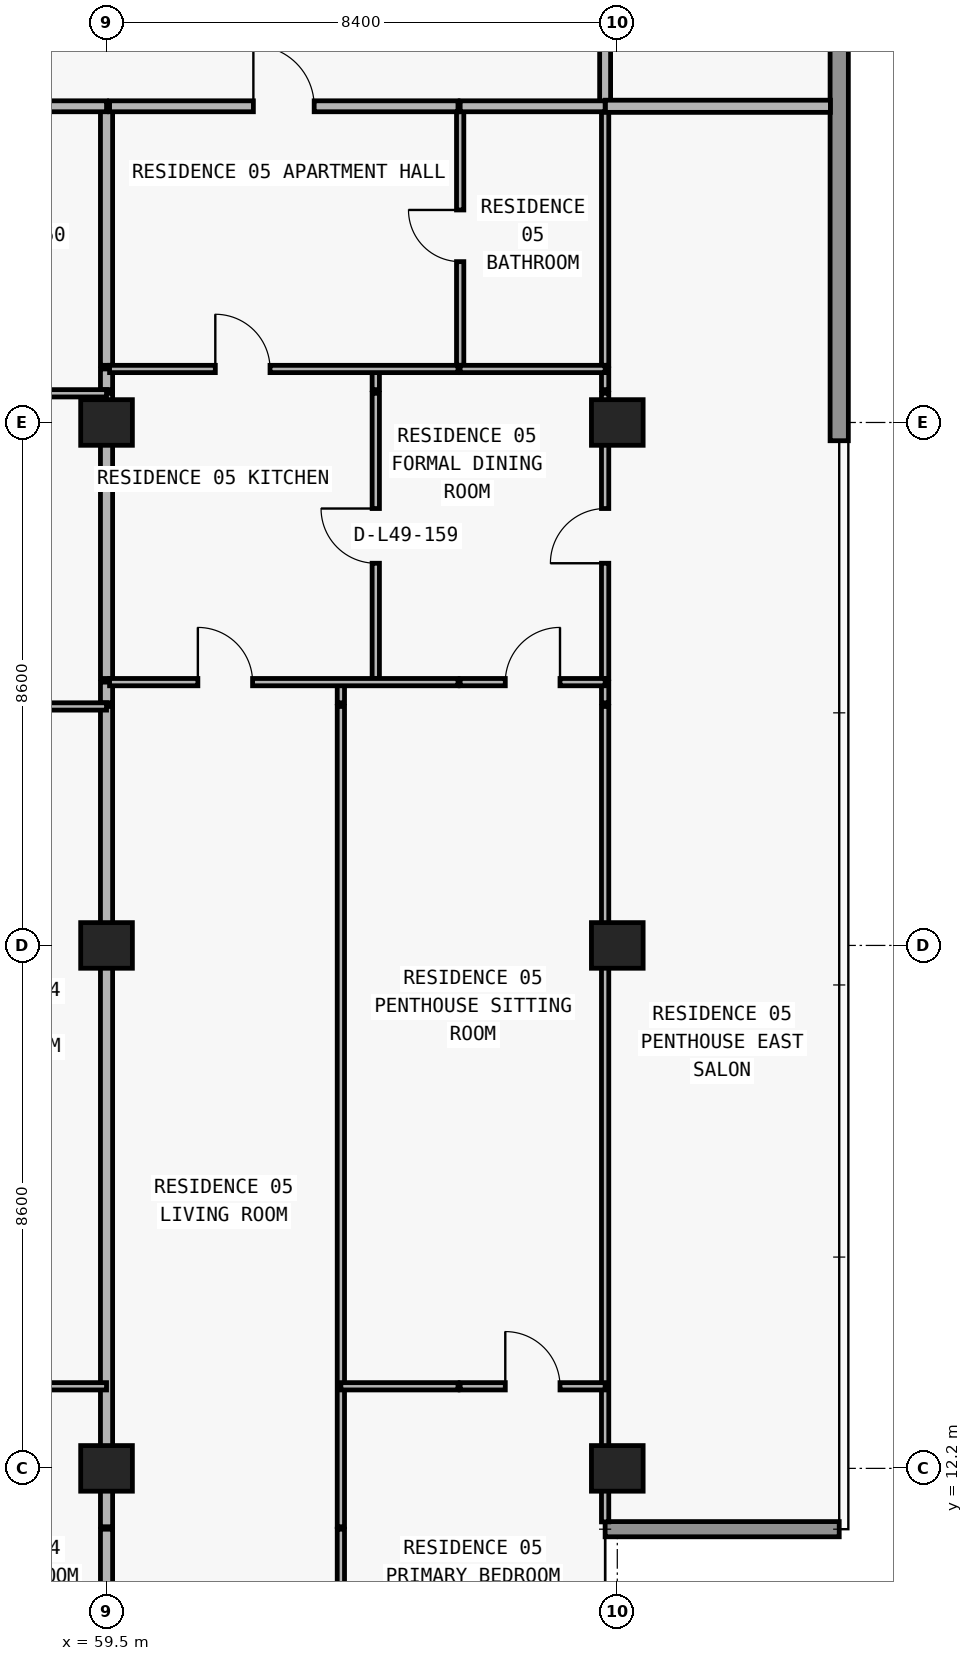
"""IFC4 building model, lengths in metres.
Left out: names, types, materials, properties, quantities, classifications, styles, units other than length and angle.
Written with IfcOpenShell. Run it as: python <this file> out.ifc"""

import sys

from ifc_helpers import new_model, si_unit, direction, frame, frame_2d, origin, origin_2d, place, context, subcontext, project, spatial, rectangle, extrude, element, fill, save


model = new_model("IFC4")
c1 = context("Model", 3, precision=1e-05, world=origin(), true_north=direction((0.0, 1.0)))
c2 = subcontext(c1, "Body", "Model", "MODEL_VIEW")
j1 = project(units=[si_unit("LENGTHUNIT", "METRE"), si_unit("PLANEANGLEUNIT", "RADIAN")], contexts=[c1])
p1 = place(None, origin())
s1 = spatial("IfcSite", under=j1, at=p1, CompositionType="ELEMENT")
p2 = place(p1, origin())
s2 = spatial("IfcBuilding", under=s1, at=p2, CompositionType="ELEMENT")
p3 = place(p2, frame((0.0, 0.0, 177.0)))
s3 = spatial("IfcBuildingStorey", under=s2, at=p3, CompositionType="ELEMENT", Elevation=177.0)
for number, where, z_axis, x_axis in (
    (1, (59.5, 12.2, 0.0), (0.0, 0.0, 1.0), (1.0, 0.0, 0.0)),
    (2, (67.9, 12.2, 0.0), (0.0, 0.0, 1.0), (1.0, 0.0, 0.0)),
    (3, (59.5, 20.8, 0.0), (0.0, 0.0, 1.0), (1.0, 0.0, 0.0)),
    (4, (67.9, 20.8, 0.0), (0.0, 0.0, 1.0), (1.0, 0.0, 0.0)),
    (5, (59.5, 29.4, 0.0), (0.0, 0.0, 1.0), (1.0, 0.0, 0.0)),
    (6, (67.9, 29.4, 0.0), (0.0, 0.0, 1.0), (1.0, 0.0, 0.0)),
):
    element("IfcColumn", number, at=place(p3, frame(where, z_axis=z_axis, x_axis=x_axis)), inside=s3, PredefinedType="COLUMN", context=c2, shape_type="SweptSolid", body=[
        extrude(rectangle(XDim=0.85, YDim=0.75, at=origin_2d()), origin(), (0.0, 0.0, 1.0), 3.05),
    ])
p4 = place(p3, frame((67.7, 11.2, 0.0), z_axis=(0.0, 0.0, 1.0), x_axis=(1.0, 0.0, 0.0)))
e7 = element("IfcWall", 7, at=p4, inside=s3, PredefinedType="ELEMENTEDWALL", context=c2, shape_type="SweptSolid", body=[
    extrude(rectangle(XDim=3.85, YDim=0.25, at=frame_2d((1.925, 0.0))), origin(), (0.0, 0.0, 1.0), 3.05),
])
p5 = place(p3, frame((71.55, 47.0, 0.0), z_axis=(0.0, 0.0, 1.0), x_axis=(0.0, -1.0, 0.0)))
e8 = element("IfcWall", 8, at=p5, inside=s3, PredefinedType="STANDARD", context=c2, shape_type="SweptSolid", body=[
    extrude(rectangle(XDim=17.9, YDim=0.3, at=frame_2d((8.95, 0.0))), origin(), (0.0, 0.0, 1.0), 3.05),
])
p6 = place(p3, frame((59.5, 7.895, 0.0), z_axis=(0.0, 0.0, 1.0), x_axis=(0.0, 1.0, 0.0)))
e9 = element("IfcWall", 9, at=p6, inside=s3, PredefinedType="PARTITIONING", context=c2, shape_type="SweptSolid", body=[
    extrude(rectangle(XDim=3.305, YDim=0.2, at=frame_2d((1.652, 0.0))), origin(), (0.0, 0.0, 1.0), 3.05),
])
p7 = place(p3, frame((59.5, 11.24, 0.0), z_axis=(0.0, 0.0, 1.0), x_axis=(0.0, 1.0, 0.0)))
e10 = element("IfcWall", 10, at=p7, inside=s3, PredefinedType="PARTITIONING", context=c2, shape_type="SweptSolid", body=[
    extrude(rectangle(XDim=13.49, YDim=0.2, at=frame_2d((6.745, 0.0))), origin(), (0.0, 0.0, 1.0), 2.263),
])
p8 = place(p3, frame((59.5, 24.79, 0.0), z_axis=(0.0, 0.0, 1.0), x_axis=(0.0, 1.0, 0.0)))
e11 = element("IfcWall", 11, at=p8, inside=s3, PredefinedType="PARTITIONING", context=c2, shape_type="SweptSolid", body=[
    extrude(rectangle(XDim=0.34, YDim=0.2, at=frame_2d((0.17, 0.0))), origin(), (0.0, 0.0, 1.0), 2.263),
])
p9 = place(p3, frame((59.5, 25.19, 0.0), z_axis=(0.0, 0.0, 1.0), x_axis=(0.0, 1.0, 0.0)))
e12 = element("IfcWall", 12, at=p9, inside=s3, PredefinedType="PARTITIONING", context=c2, shape_type="SweptSolid", body=[
    extrude(rectangle(XDim=4.69, YDim=0.2, at=frame_2d((2.345, 0.0))), origin(), (0.0, 0.0, 1.0), 2.263),
])
p10 = place(p3, frame((59.5, 29.94, 0.0), z_axis=(0.0, 0.0, 1.0), x_axis=(0.0, 1.0, 0.0)))
e13 = element("IfcWall", 13, at=p10, inside=s3, PredefinedType="PARTITIONING", context=c2, shape_type="SweptSolid", body=[
    extrude(rectangle(XDim=0.34, YDim=0.2, at=frame_2d((0.17, 0.0))), origin(), (0.0, 0.0, 1.0), 2.263),
])
p11 = place(p3, frame((59.5, 30.34, 0.0), z_axis=(0.0, 0.0, 1.0), x_axis=(0.0, 1.0, 0.0)))
e14 = element("IfcWall", 14, at=p11, inside=s3, PredefinedType="PARTITIONING", context=c2, shape_type="SweptSolid", body=[
    extrude(rectangle(XDim=4.26, YDim=0.2, at=frame_2d((2.13, 0.0))), origin(), (0.0, 0.0, 1.0), 2.263),
])
p12 = place(p3, frame((63.354, 7.895, 0.0), z_axis=(0.0, 0.0, 1.0), x_axis=(0.0, 1.0, 0.0)))
e15 = element("IfcWall", 15, at=p12, inside=s3, PredefinedType="PARTITIONING", context=c2, shape_type="SweptSolid", body=[
    extrude(rectangle(XDim=3.305, YDim=0.12, at=frame_2d((1.652, 0.0))), origin(), (0.0, 0.0, 1.0), 3.05),
])
p13 = place(p3, frame((63.354, 11.24, 0.0), z_axis=(0.0, 0.0, 1.0), x_axis=(0.0, 1.0, 0.0)))
e16 = element("IfcWall", 16, at=p13, inside=s3, PredefinedType="PARTITIONING", context=c2, shape_type="SweptSolid", body=[
    extrude(rectangle(XDim=13.49, YDim=0.12, at=frame_2d((6.745, 0.0))), origin(), (0.0, 0.0, 1.0), 3.05),
])
p14 = place(p3, frame((63.354, 24.79, 0.0), z_axis=(0.0, 0.0, 1.0), x_axis=(0.0, 1.0, 0.0)))
e17 = element("IfcWall", 17, at=p14, inside=s3, PredefinedType="PARTITIONING", context=c2, shape_type="SweptSolid", body=[
    extrude(rectangle(XDim=0.34, YDim=0.12, at=frame_2d((0.17, 0.0))), origin(), (0.0, 0.0, 1.0), 3.05),
])
p15 = place(p3, frame((63.928, 25.19, 0.0), z_axis=(0.0, 0.0, 1.0), x_axis=(0.0, 1.0, 0.0)))
e18 = element("IfcWall", 18, at=p15, inside=s3, PredefinedType="PARTITIONING", context=c2, shape_type="SweptSolid", body=[
    extrude(rectangle(XDim=4.69, YDim=0.12, at=frame_2d((2.345, 0.0))), origin(), (0.0, 0.0, 1.0), 2.499),
])
p16 = place(p15, frame((1.895, 0.0, 0.0)))
e19 = element("IfcOpeningElement", 19, at=p16, cuts=e18, PredefinedType="OPENING", context=c2, shape_type="SweptSolid", body=[
    extrude(rectangle(XDim=0.9, YDim=2.15, at=frame_2d((0.45, 1.075))), frame((0.0, 0.07, 0.0), z_axis=(0.0, -1.0, 0.0), x_axis=(1.0, 0.0, 0.0)), (0.0, 0.0, 1.0), 0.14),
])
p17 = place(p3, frame((63.928, 29.94, 0.0), z_axis=(0.0, 0.0, 1.0), x_axis=(0.0, 1.0, 0.0)))
e20 = element("IfcWall", 20, at=p17, inside=s3, PredefinedType="PARTITIONING", context=c2, shape_type="SweptSolid", body=[
    extrude(rectangle(XDim=0.34, YDim=0.12, at=frame_2d((0.17, 0.0))), origin(), (0.0, 0.0, 1.0), 2.499),
])
p18 = place(p3, frame((65.316, 30.34, 0.0), z_axis=(0.0, 0.0, 1.0), x_axis=(0.0, 1.0, 0.0)))
e21 = element("IfcWall", 21, at=p18, inside=s3, PredefinedType="PARTITIONING", context=c2, shape_type="SweptSolid", body=[
    extrude(rectangle(XDim=4.26, YDim=0.12, at=frame_2d((2.13, 0.0))), origin(), (0.0, 0.0, 1.0), 3.05),
])
p19 = place(p18, frame((1.705, 0.0, 0.0)))
e22 = element("IfcOpeningElement", 22, at=p19, cuts=e21, PredefinedType="OPENING", context=c2, shape_type="SweptSolid", body=[
    extrude(rectangle(XDim=0.85, YDim=2.1, at=frame_2d((0.425, 1.05))), frame((0.0, 0.07, 0.0), z_axis=(0.0, -1.0, 0.0), x_axis=(1.0, 0.0, 0.0)), (0.0, 0.0, 1.0), 0.14),
])
p20 = place(p3, frame((67.7, 11.32, 0.0), z_axis=(0.0, 0.0, 1.0), x_axis=(0.0, 1.0, 0.0)))
e23 = element("IfcWall", 23, at=p20, inside=s3, PredefinedType="PARTITIONING", context=c2, shape_type="SweptSolid", body=[
    extrude(rectangle(XDim=13.41, YDim=0.12, at=frame_2d((6.705, 0.0))), origin(), (0.0, 0.0, 1.0), 2.263),
])
p21 = place(p3, frame((67.7, 24.79, 0.0), z_axis=(0.0, 0.0, 1.0), x_axis=(0.0, 1.0, 0.0)))
e24 = element("IfcWall", 24, at=p21, inside=s3, PredefinedType="PARTITIONING", context=c2, shape_type="SweptSolid", body=[
    extrude(rectangle(XDim=0.34, YDim=0.12, at=frame_2d((0.17, 0.0))), origin(), (0.0, 0.0, 1.0), 2.263),
])
p22 = place(p3, frame((67.7, 25.19, 0.0), z_axis=(0.0, 0.0, 1.0), x_axis=(0.0, 1.0, 0.0)))
e25 = element("IfcWall", 25, at=p22, inside=s3, PredefinedType="PARTITIONING", context=c2, shape_type="SweptSolid", body=[
    extrude(rectangle(XDim=4.69, YDim=0.12, at=frame_2d((2.345, 0.0))), origin(), (0.0, 0.0, 1.0), 2.263),
])
p23 = place(p22, frame((1.895, 0.0, 0.0)))
e26 = element("IfcOpeningElement", 26, at=p23, cuts=e25, PredefinedType="OPENING", context=c2, shape_type="SweptSolid", body=[
    extrude(rectangle(XDim=0.9, YDim=2.15, at=frame_2d((0.45, 1.075))), frame((0.0, 0.07, 0.0), z_axis=(0.0, -1.0, 0.0), x_axis=(1.0, 0.0, 0.0)), (0.0, 0.0, 1.0), 0.14),
])
p24 = place(p3, frame((67.7, 29.94, 0.0), z_axis=(0.0, 0.0, 1.0), x_axis=(0.0, 1.0, 0.0)))
e27 = element("IfcWall", 27, at=p24, inside=s3, PredefinedType="PARTITIONING", context=c2, shape_type="SweptSolid", body=[
    extrude(rectangle(XDim=0.34, YDim=0.12, at=frame_2d((0.17, 0.0))), origin(), (0.0, 0.0, 1.0), 2.263),
])
p25 = place(p3, frame((67.7, 30.34, 0.0), z_axis=(0.0, 0.0, 1.0), x_axis=(0.0, 1.0, 0.0)))
e28 = element("IfcWall", 28, at=p25, inside=s3, PredefinedType="PARTITIONING", context=c2, shape_type="SweptSolid", body=[
    extrude(rectangle(XDim=4.26, YDim=0.12, at=frame_2d((2.13, 0.0))), origin(), (0.0, 0.0, 1.0), 2.263),
])
p26 = place(p3, frame((67.7, 34.605, 0.0), z_axis=(0.0, 0.0, 1.0), x_axis=(0.0, 1.0, 0.0)))
e29 = element("IfcWall", 29, at=p26, inside=s3, PredefinedType="PARTITIONING", context=c2, shape_type="SweptSolid", body=[
    extrude(rectangle(XDim=2.345, YDim=0.18, at=frame_2d((1.172, 0.0))), origin(), (0.0, 0.0, 1.0), 2.263),
])
p27 = place(p3, frame((55.72, 13.55, 0.0), z_axis=(0.0, 0.0, 1.0), x_axis=(1.0, 0.0, 0.0)))
e30 = element("IfcWall", 30, at=p27, inside=s3, PredefinedType="PARTITIONING", context=c2, shape_type="SweptSolid", body=[
    extrude(rectangle(XDim=3.78, YDim=0.12, at=frame_2d((1.89, 0.0))), origin(), (0.0, 0.0, 1.0), 3.05),
])
p28 = place(p27, frame((1.44, 0.0, 0.0)))
e31 = element("IfcOpeningElement", 31, at=p28, cuts=e30, PredefinedType="OPENING", context=c2, shape_type="SweptSolid", body=[
    extrude(rectangle(XDim=0.9, YDim=2.15, at=frame_2d((0.45, 1.075))), frame((0.0, 0.07, 0.0), z_axis=(0.0, -1.0, 0.0), x_axis=(1.0, 0.0, 0.0)), (0.0, 0.0, 1.0), 0.14),
])
p29 = place(p3, frame((63.354, 13.55, 0.0), z_axis=(0.0, 0.0, 1.0), x_axis=(1.0, 0.0, 0.0)))
e32 = element("IfcWall", 32, at=p29, inside=s3, PredefinedType="PARTITIONING", context=c2, shape_type="SweptSolid", body=[
    extrude(rectangle(XDim=1.926, YDim=0.12, at=frame_2d((0.963, 0.0))), origin(), (0.0, 0.0, 1.0), 3.05),
])
p30 = place(p3, frame((65.316, 13.55, 0.0), z_axis=(0.0, 0.0, 1.0), x_axis=(1.0, 0.0, 0.0)))
e33 = element("IfcWall", 33, at=p30, inside=s3, PredefinedType="PARTITIONING", context=c2, shape_type="SweptSolid", body=[
    extrude(rectangle(XDim=2.384, YDim=0.12, at=frame_2d((1.192, 0.0))), origin(), (0.0, 0.0, 1.0), 3.05),
])
p31 = place(p30, frame((0.742, 0.0, 0.0)))
e34 = element("IfcOpeningElement", 34, at=p31, cuts=e33, PredefinedType="OPENING", context=c2, shape_type="SweptSolid", body=[
    extrude(rectangle(XDim=0.9, YDim=2.15, at=frame_2d((0.45, 1.075))), frame((0.0, 0.07, 0.0), z_axis=(0.0, -1.0, 0.0), x_axis=(1.0, 0.0, 0.0)), (0.0, 0.0, 1.0), 0.14),
])
p32 = place(p3, frame((51.32, 24.73, 0.0), z_axis=(0.0, 0.0, 1.0), x_axis=(1.0, 0.0, 0.0)))
e35 = element("IfcWall", 35, at=p32, inside=s3, PredefinedType="PARTITIONING", context=c2, shape_type="SweptSolid", body=[
    extrude(rectangle(XDim=8.18, YDim=0.12, at=frame_2d((4.09, 0.0))), origin(), (0.0, 0.0, 1.0), 3.05),
])
p33 = place(p32, frame((1.583, 0.0, 0.0)))
e36 = element("IfcOpeningElement", 36, at=p33, cuts=e35, PredefinedType="OPENING", context=c2, shape_type="SweptSolid", body=[
    extrude(rectangle(XDim=0.9, YDim=2.15, at=frame_2d((0.45, 1.075))), frame((0.0, 0.07, 0.0), z_axis=(0.0, -1.0, 0.0), x_axis=(1.0, 0.0, 0.0)), (0.0, 0.0, 1.0), 0.14),
])
p34 = place(p32, frame((5.84, 0.0, 0.0)))
e37 = element("IfcOpeningElement", 37, at=p34, cuts=e35, PredefinedType="OPENING", context=c2, shape_type="SweptSolid", body=[
    extrude(rectangle(XDim=0.9, YDim=2.15, at=frame_2d((0.45, 1.075))), frame((0.0, 0.07, 0.0), z_axis=(0.0, -1.0, 0.0), x_axis=(1.0, 0.0, 0.0)), (0.0, 0.0, 1.0), 0.14),
])
p35 = place(p3, frame((59.55, 25.13, 0.0), z_axis=(0.0, 0.0, 1.0), x_axis=(1.0, 0.0, 0.0)))
e38 = element("IfcWall", 38, at=p35, inside=s3, PredefinedType="PARTITIONING", context=c2, shape_type="SweptSolid", body=[
    extrude(rectangle(XDim=5.73, YDim=0.12, at=frame_2d((2.865, 0.0))), origin(), (0.0, 0.0, 1.0), 3.05),
])
p36 = place(p35, frame((1.452, 0.0, 0.0)))
e39 = element("IfcOpeningElement", 39, at=p36, cuts=e38, PredefinedType="OPENING", context=c2, shape_type="SweptSolid", body=[
    extrude(rectangle(XDim=0.9, YDim=2.15, at=frame_2d((0.45, 1.075))), frame((0.0, 0.07, 0.0), z_axis=(0.0, -1.0, 0.0), x_axis=(1.0, 0.0, 0.0)), (0.0, 0.0, 1.0), 0.14),
])
p37 = place(p3, frame((65.316, 25.13, 0.0), z_axis=(0.0, 0.0, 1.0), x_axis=(1.0, 0.0, 0.0)))
e40 = element("IfcWall", 40, at=p37, inside=s3, PredefinedType="PARTITIONING", context=c2, shape_type="SweptSolid", body=[
    extrude(rectangle(XDim=2.384, YDim=0.12, at=frame_2d((1.192, 0.0))), origin(), (0.0, 0.0, 1.0), 3.05),
])
p38 = place(p37, frame((0.742, 0.0, 0.0)))
e41 = element("IfcOpeningElement", 41, at=p38, cuts=e40, PredefinedType="OPENING", context=c2, shape_type="SweptSolid", body=[
    extrude(rectangle(XDim=0.9, YDim=2.15, at=frame_2d((0.45, 1.075))), frame((0.0, 0.07, 0.0), z_axis=(0.0, -1.0, 0.0), x_axis=(1.0, 0.0, 0.0)), (0.0, 0.0, 1.0), 0.14),
])
p39 = place(p3, frame((51.1, 29.88, 0.0), z_axis=(0.0, 0.0, 1.0), x_axis=(1.0, 0.0, 0.0)))
e42 = element("IfcWall", 42, at=p39, inside=s3, PredefinedType="PARTITIONING", context=c2, shape_type="SweptSolid", body=[
    extrude(rectangle(XDim=8.4, YDim=0.12, at=frame_2d((4.2, 0.0))), origin(), (0.0, 0.0, 1.0), 3.05),
])
p40 = place(p39, frame((1.693, 0.0, 0.0)))
e43 = element("IfcOpeningElement", 43, at=p40, cuts=e42, PredefinedType="OPENING", context=c2, shape_type="SweptSolid", body=[
    extrude(rectangle(XDim=0.9, YDim=2.15, at=frame_2d((0.45, 1.075))), frame((0.0, 0.07, 0.0), z_axis=(0.0, -1.0, 0.0), x_axis=(1.0, 0.0, 0.0)), (0.0, 0.0, 1.0), 0.14),
])
p41 = place(p3, frame((59.55, 30.28, 0.0), z_axis=(0.0, 0.0, 1.0), x_axis=(1.0, 0.0, 0.0)))
e44 = element("IfcWall", 44, at=p41, inside=s3, PredefinedType="PARTITIONING", context=c2, shape_type="SweptSolid", body=[
    extrude(rectangle(XDim=5.73, YDim=0.12, at=frame_2d((2.865, 0.0))), origin(), (0.0, 0.0, 1.0), 3.05),
])
p42 = place(p41, frame((1.739, 0.0, 0.0)))
e45 = element("IfcOpeningElement", 45, at=p42, cuts=e44, PredefinedType="OPENING", context=c2, shape_type="SweptSolid", body=[
    extrude(rectangle(XDim=0.9, YDim=2.15, at=frame_2d((0.45, 1.075))), frame((0.0, 0.07, 0.0), z_axis=(0.0, -1.0, 0.0), x_axis=(1.0, 0.0, 0.0)), (0.0, 0.0, 1.0), 0.14),
])
p43 = place(p3, frame((65.316, 30.28, 0.0), z_axis=(0.0, 0.0, 1.0), x_axis=(1.0, 0.0, 0.0)))
e46 = element("IfcWall", 46, at=p43, inside=s3, PredefinedType="PARTITIONING", context=c2, shape_type="SweptSolid", body=[
    extrude(rectangle(XDim=2.384, YDim=0.12, at=frame_2d((1.192, 0.0))), origin(), (0.0, 0.0, 1.0), 3.05),
])
p44 = place(p3, frame((18.3, 34.6, 0.0), z_axis=(0.0, 0.0, 1.0), x_axis=(1.0, 0.0, 0.0)))
e47 = element("IfcWall", 47, at=p44, inside=s3, PredefinedType="PARTITIONING", context=c2, shape_type="SweptSolid", body=[
    extrude(rectangle(XDim=41.2, YDim=0.18, at=frame_2d((20.6, 0.0))), origin(), (0.0, 0.0, 1.0), 3.05),
])
p45 = place(p44, frame((2.67, 0.0, 0.0)))
e48 = element("IfcOpeningElement", 48, at=p45, cuts=e47, PredefinedType="OPENING", context=c2, shape_type="SweptSolid", body=[
    extrude(rectangle(XDim=1.0, YDim=2.2, at=frame_2d((0.5, 1.1))), frame((0.0, 0.1, 0.0), z_axis=(0.0, -1.0, 0.0), x_axis=(1.0, 0.0, 0.0)), (0.0, 0.0, 1.0), 0.2),
])
p46 = place(p44, frame((11.212, 0.0, 0.0)))
e49 = element("IfcOpeningElement", 49, at=p46, cuts=e47, PredefinedType="OPENING", context=c2, shape_type="SweptSolid", body=[
    extrude(rectangle(XDim=1.0, YDim=2.2, at=frame_2d((0.5, 1.1))), frame((0.0, 0.1, 0.0), z_axis=(0.0, -1.0, 0.0), x_axis=(1.0, 0.0, 0.0)), (0.0, 0.0, 1.0), 0.2),
])
p47 = place(p44, frame((35.483, 0.0, 0.0)))
e50 = element("IfcOpeningElement", 50, at=p47, cuts=e47, PredefinedType="OPENING", context=c2, shape_type="SweptSolid", body=[
    extrude(rectangle(XDim=1.0, YDim=2.2, at=frame_2d((0.5, 1.1))), frame((0.0, 0.1, 0.0), z_axis=(0.0, -1.0, 0.0), x_axis=(1.0, 0.0, 0.0)), (0.0, 0.0, 1.0), 0.2),
])
p48 = place(p3, frame((59.55, 34.6, 0.0), z_axis=(0.0, 0.0, 1.0), x_axis=(1.0, 0.0, 0.0)))
e51 = element("IfcWall", 51, at=p48, inside=s3, PredefinedType="PARTITIONING", context=c2, shape_type="SweptSolid", body=[
    extrude(rectangle(XDim=5.73, YDim=0.18, at=frame_2d((2.865, 0.0))), origin(), (0.0, 0.0, 1.0), 3.05),
])
p49 = place(p48, frame((2.365, 0.0, 0.0)))
e52 = element("IfcOpeningElement", 52, at=p49, cuts=e51, PredefinedType="OPENING", context=c2, shape_type="SweptSolid", body=[
    extrude(rectangle(XDim=1.0, YDim=2.2, at=frame_2d((0.5, 1.1))), frame((0.0, 0.1, 0.0), z_axis=(0.0, -1.0, 0.0), x_axis=(1.0, 0.0, 0.0)), (0.0, 0.0, 1.0), 0.2),
])
p50 = place(p3, frame((65.316, 34.6, 0.0), z_axis=(0.0, 0.0, 1.0), x_axis=(1.0, 0.0, 0.0)))
e53 = element("IfcWall", 53, at=p50, inside=s3, PredefinedType="PARTITIONING", context=c2, shape_type="SweptSolid", body=[
    extrude(rectangle(XDim=2.384, YDim=0.18, at=frame_2d((1.192, 0.0))), origin(), (0.0, 0.0, 1.0), 3.05),
])
p51 = place(p3, frame((67.705, 34.6, 0.0), z_axis=(0.0, 0.0, 1.0), x_axis=(1.0, 0.0, 0.0)))
e54 = element("IfcWall", 54, at=p51, inside=s3, PredefinedType="PARTITIONING", context=c2, shape_type="SweptSolid", body=[
    extrude(rectangle(XDim=3.7, YDim=0.2, at=frame_2d((1.85, 0.0))), origin(), (0.0, 0.0, 1.0), 3.05),
])
p52 = place(p49, origin())
e55 = element("IfcDoor", 55, at=p52, inside=s3, OperationType="SINGLE_SWING_LEFT", PredefinedType="DOOR", context=c2, shape_type="SweptSolid", body=[
    extrude(rectangle(XDim=1.0, YDim=2.2, at=frame_2d((0.5, 1.1))), frame((0.0, 0.025, 0.0), z_axis=(0.0, -1.0, 0.0), x_axis=(1.0, 0.0, 0.0)), (0.0, 0.0, 1.0), 0.05),
])
fill(e52, e55)
p53 = place(p19, origin())
e56 = element("IfcDoor", 56, at=p53, inside=s3, OperationType="SINGLE_SWING_RIGHT", PredefinedType="DOOR", context=c2, shape_type="SweptSolid", body=[
    extrude(rectangle(XDim=0.85, YDim=2.1, at=frame_2d((0.425, 1.05))), frame((0.0, 0.025, 0.0), z_axis=(0.0, -1.0, 0.0), x_axis=(1.0, 0.0, 0.0)), (0.0, 0.0, 1.0), 0.05),
])
fill(e22, e56)
p54 = place(p42, origin())
e57 = element("IfcDoor", 57, at=p54, inside=s3, OperationType="SINGLE_SWING_LEFT", PredefinedType="DOOR", context=c2, shape_type="SweptSolid", body=[
    extrude(rectangle(XDim=0.9, YDim=2.15, at=frame_2d((0.45, 1.075))), frame((0.0, 0.025, 0.0), z_axis=(0.0, -1.0, 0.0), x_axis=(1.0, 0.0, 0.0)), (0.0, 0.0, 1.0), 0.05),
])
fill(e45, e57)
p55 = place(p16, origin())
e58 = element("IfcDoor", 58, at=p55, inside=s3, OperationType="SINGLE_SWING_RIGHT", PredefinedType="DOOR", context=c2, shape_type="SweptSolid", body=[
    extrude(rectangle(XDim=0.9, YDim=2.15, at=frame_2d((0.45, 1.075))), frame((0.0, 0.025, 0.0), z_axis=(0.0, -1.0, 0.0), x_axis=(1.0, 0.0, 0.0)), (0.0, 0.0, 1.0), 0.05),
])
fill(e19, e58)
p56 = place(p36, origin())
e59 = element("IfcDoor", 59, at=p56, inside=s3, OperationType="SINGLE_SWING_LEFT", PredefinedType="DOOR", context=c2, shape_type="SweptSolid", body=[
    extrude(rectangle(XDim=0.9, YDim=2.15, at=frame_2d((0.45, 1.075))), frame((0.0, 0.025, 0.0), z_axis=(0.0, -1.0, 0.0), x_axis=(1.0, 0.0, 0.0)), (0.0, 0.0, 1.0), 0.05),
])
fill(e39, e59)
p57 = place(p38, origin())
e60 = element("IfcDoor", 60, at=p57, inside=s3, OperationType="SINGLE_SWING_RIGHT", PredefinedType="DOOR", context=c2, shape_type="SweptSolid", body=[
    extrude(rectangle(XDim=0.9, YDim=2.15, at=frame_2d((0.45, 1.075))), frame((0.0, 0.025, 0.0), z_axis=(0.0, -1.0, 0.0), x_axis=(1.0, 0.0, 0.0)), (0.0, 0.0, 1.0), 0.05),
])
fill(e41, e60)
p58 = place(p31, origin())
e61 = element("IfcDoor", 61, at=p58, inside=s3, OperationType="SINGLE_SWING_LEFT", PredefinedType="DOOR", context=c2, shape_type="SweptSolid", body=[
    extrude(rectangle(XDim=0.9, YDim=2.15, at=frame_2d((0.45, 1.075))), frame((0.0, 0.025, 0.0), z_axis=(0.0, -1.0, 0.0), x_axis=(1.0, 0.0, 0.0)), (0.0, 0.0, 1.0), 0.05),
])
fill(e34, e61)
p59 = place(p23, origin())
e62 = element("IfcDoor", 62, at=p59, inside=s3, OperationType="SINGLE_SWING_LEFT", PredefinedType="DOOR", context=c2, shape_type="SweptSolid", body=[
    extrude(rectangle(XDim=0.9, YDim=2.15, at=frame_2d((0.45, 1.075))), frame((0.0, 0.025, 0.0), z_axis=(0.0, -1.0, 0.0), x_axis=(1.0, 0.0, 0.0)), (0.0, 0.0, 1.0), 0.05),
])
fill(e26, e62)
save(model, sys.argv[1])
